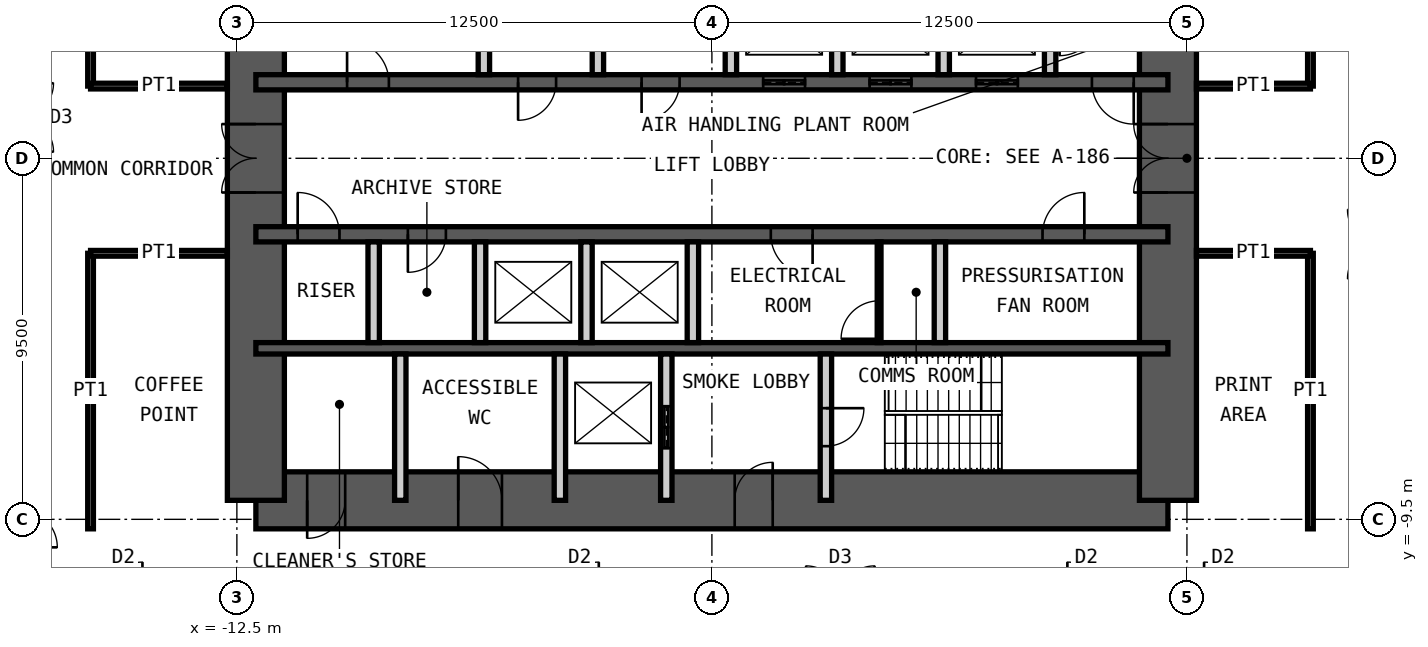
"""IFC4 building model, lengths in metres.
Left out: names, types, materials, properties, quantities, classifications, styles, units other than length and angle.
Written with IfcOpenShell. Run it as: python <this file> out.ifc"""

import sys

from ifc_helpers import new_model, si_unit, direction, frame, frame_2d, origin, place, context, subcontext, project, spatial, rectangle, extrude, element, fill, save


model = new_model("IFC4")
c1 = context("Model", 3, precision=1e-05, world=origin(), true_north=direction((0.0, 1.0)))
c2 = subcontext(c1, "Body", "Model", "MODEL_VIEW")
j1 = project(units=[si_unit("LENGTHUNIT", "METRE"), si_unit("PLANEANGLEUNIT", "RADIAN")], contexts=[c1])
p1 = place(None, origin())
s1 = spatial("IfcSite", under=j1, at=p1, CompositionType="ELEMENT")
p2 = place(p1, origin())
s2 = spatial("IfcBuilding", under=s1, at=p2, CompositionType="ELEMENT")
p3 = place(p2, frame((0.0, 0.0, 161.8)))
s3 = spatial("IfcBuildingStorey", under=s2, at=p3, CompositionType="ELEMENT", Elevation=161.8)
p4 = place(p3, frame((-12.0, -9.0, 0.0), z_axis=(0.0, 0.0, 1.0), x_axis=(1.0, 0.0, 0.0)))
e1 = element("IfcWall", 1, at=p4, inside=s3, PredefinedType="SHEAR", context=c2, shape_type="SweptSolid", body=[
    extrude(rectangle(XDim=24.0, YDim=1.5, at=frame_2d((12.0, 0.0))), origin(), (0.0, 0.0, 1.0), 4.2),
])
p5 = place(p4, frame((1.35, 0.0, 0.0)))
e2 = element("IfcOpeningElement", 2, at=p5, cuts=e1, PredefinedType="OPENING", context=c2, shape_type="SweptSolid", body=[
    extrude(rectangle(XDim=1.0, YDim=2.1, at=frame_2d((0.5, 1.05))), frame((0.0, 0.76, 0.0), z_axis=(0.0, -1.0, 0.0), x_axis=(1.0, 0.0, 0.0)), (0.0, 0.0, 1.0), 1.52),
])
p6 = place(p4, frame((5.325, 0.0, 0.0)))
e3 = element("IfcOpeningElement", 3, at=p6, cuts=e1, PredefinedType="OPENING", context=c2, shape_type="SweptSolid", body=[
    extrude(rectangle(XDim=1.15, YDim=2.1, at=frame_2d((0.575, 1.05))), frame((0.0, 0.76, 0.0), z_axis=(0.0, -1.0, 0.0), x_axis=(1.0, 0.0, 0.0)), (0.0, 0.0, 1.0), 1.52),
])
p7 = place(p4, frame((12.6, 0.0, 0.0)))
e4 = element("IfcOpeningElement", 4, at=p7, cuts=e1, PredefinedType="OPENING", context=c2, shape_type="SweptSolid", body=[
    extrude(rectangle(XDim=1.0, YDim=2.1, at=frame_2d((0.5, 1.05))), frame((0.0, 0.76, 0.0), z_axis=(0.0, -1.0, 0.0), x_axis=(1.0, 0.0, 0.0)), (0.0, 0.0, 1.0), 1.52),
])
p8 = place(p3, frame((12.0, -9.0, 0.0), z_axis=(0.0, 0.0, 1.0), x_axis=(0.0, 1.0, 0.0)))
e5 = element("IfcWall", 5, at=p8, inside=s3, PredefinedType="SHEAR", context=c2, shape_type="SweptSolid", body=[
    extrude(rectangle(XDim=18.0, YDim=1.5, at=frame_2d((9.0, 0.0))), origin(), (0.0, 0.0, 1.0), 4.2),
])
p9 = place(p8, frame((8.1, 0.0, 0.0)))
e6 = element("IfcOpeningElement", 6, at=p9, cuts=e5, PredefinedType="OPENING", context=c2, shape_type="SweptSolid", body=[
    extrude(rectangle(XDim=1.8, YDim=2.1, at=frame_2d((0.9, 1.05))), frame((0.0, 0.76, 0.0), z_axis=(0.0, -1.0, 0.0), x_axis=(1.0, 0.0, 0.0)), (0.0, 0.0, 1.0), 1.52),
])
p10 = place(p3, frame((-12.0, -9.0, 0.0), z_axis=(0.0, 0.0, 1.0), x_axis=(0.0, 1.0, 0.0)))
e7 = element("IfcWall", 7, at=p10, inside=s3, PredefinedType="SHEAR", context=c2, shape_type="SweptSolid", body=[
    extrude(rectangle(XDim=18.0, YDim=1.5, at=frame_2d((9.0, 0.0))), origin(), (0.0, 0.0, 1.0), 4.2),
])
p11 = place(p10, frame((8.1, 0.0, 0.0)))
e8 = element("IfcOpeningElement", 8, at=p11, cuts=e7, PredefinedType="OPENING", context=c2, shape_type="SweptSolid", body=[
    extrude(rectangle(XDim=1.8, YDim=2.1, at=frame_2d((0.9, 1.05))), frame((0.0, 0.76, 0.0), z_axis=(0.0, -1.0, 0.0), x_axis=(1.0, 0.0, 0.0)), (0.0, 0.0, 1.0), 1.52),
])
p12 = place(p3, frame((-12.0, 2.0, 0.0), z_axis=(0.0, 0.0, 1.0), x_axis=(1.0, 0.0, 0.0)))
e9 = element("IfcWall", 9, at=p12, inside=s3, PredefinedType="SHEAR", context=c2, shape_type="SweptSolid", body=[
    extrude(rectangle(XDim=24.0, YDim=0.4, at=frame_2d((12.0, 0.0))), origin(), (0.0, 0.0, 1.0), 4.2),
])
p13 = place(p12, frame((2.4, 0.0, 0.0)))
e10 = element("IfcOpeningElement", 10, at=p13, cuts=e9, PredefinedType="OPENING", context=c2, shape_type="SweptSolid", body=[
    extrude(rectangle(XDim=1.1, YDim=2.1, at=frame_2d((0.55, 1.05))), frame((0.0, 0.21, 0.0), z_axis=(0.0, -1.0, 0.0), x_axis=(1.0, 0.0, 0.0)), (0.0, 0.0, 1.0), 0.42),
])
p14 = place(p12, frame((22.0, 0.0, 0.0)))
e11 = element("IfcOpeningElement", 11, at=p14, cuts=e9, PredefinedType="OPENING", context=c2, shape_type="SweptSolid", body=[
    extrude(rectangle(XDim=1.1, YDim=2.1, at=frame_2d((0.55, 1.05))), frame((0.0, 0.21, 0.0), z_axis=(0.0, -1.0, 0.0), x_axis=(1.0, 0.0, 0.0)), (0.0, 0.0, 1.0), 0.42),
])
p15 = place(p12, frame((10.15, 0.0, 0.0)))
e12 = element("IfcOpeningElement", 12, at=p15, cuts=e9, PredefinedType="OPENING", context=c2, shape_type="SweptSolid", body=[
    extrude(rectangle(XDim=1.0, YDim=2.1, at=frame_2d((0.5, 1.05))), frame((0.0, 0.21, 0.0), z_axis=(0.0, -1.0, 0.0), x_axis=(1.0, 0.0, 0.0)), (0.0, 0.0, 1.0), 0.42),
])
p16 = place(p12, frame((6.9, 0.0, 0.0)))
e13 = element("IfcOpeningElement", 13, at=p16, cuts=e9, PredefinedType="OPENING", context=c2, shape_type="SweptSolid", body=[
    extrude(rectangle(XDim=1.0, YDim=2.1, at=frame_2d((0.5, 1.05))), frame((0.0, 0.21, 0.0), z_axis=(0.0, -1.0, 0.0), x_axis=(1.0, 0.0, 0.0)), (0.0, 0.0, 1.0), 0.42),
])
p17 = place(p12, frame((13.35, 0.0, 0.0)))
e14 = element("IfcOpeningElement", 14, at=p17, cuts=e9, PredefinedType="OPENING", context=c2, shape_type="SweptSolid", body=[
    extrude(rectangle(XDim=1.1, YDim=2.4, at=frame_2d((0.55, 1.2))), frame((0.0, 0.21, 0.0), z_axis=(0.0, -1.0, 0.0), x_axis=(1.0, 0.0, 0.0)), (0.0, 0.0, 1.0), 0.42),
])
p18 = place(p12, frame((16.15, 0.0, 0.0)))
e15 = element("IfcOpeningElement", 15, at=p18, cuts=e9, PredefinedType="OPENING", context=c2, shape_type="SweptSolid", body=[
    extrude(rectangle(XDim=1.1, YDim=2.4, at=frame_2d((0.55, 1.2))), frame((0.0, 0.21, 0.0), z_axis=(0.0, -1.0, 0.0), x_axis=(1.0, 0.0, 0.0)), (0.0, 0.0, 1.0), 0.42),
])
p19 = place(p12, frame((18.95, 0.0, 0.0)))
e16 = element("IfcOpeningElement", 16, at=p19, cuts=e9, PredefinedType="OPENING", context=c2, shape_type="SweptSolid", body=[
    extrude(rectangle(XDim=1.1, YDim=2.4, at=frame_2d((0.55, 1.2))), frame((0.0, 0.21, 0.0), z_axis=(0.0, -1.0, 0.0), x_axis=(1.0, 0.0, 0.0)), (0.0, 0.0, 1.0), 0.42),
])
p20 = place(p3, frame((-12.0, -2.0, 0.0), z_axis=(0.0, 0.0, 1.0), x_axis=(1.0, 0.0, 0.0)))
e17 = element("IfcWall", 17, at=p20, inside=s3, PredefinedType="SHEAR", context=c2, shape_type="SweptSolid", body=[
    extrude(rectangle(XDim=24.0, YDim=0.4, at=frame_2d((12.0, 0.0))), origin(), (0.0, 0.0, 1.0), 4.2),
])
p21 = place(p20, frame((1.1, 0.0, 0.0)))
e18 = element("IfcOpeningElement", 18, at=p21, cuts=e17, PredefinedType="OPENING", context=c2, shape_type="SweptSolid", body=[
    extrude(rectangle(XDim=1.1, YDim=2.1, at=frame_2d((0.55, 1.05))), frame((0.0, 0.21, 0.0), z_axis=(0.0, -1.0, 0.0), x_axis=(1.0, 0.0, 0.0)), (0.0, 0.0, 1.0), 0.42),
])
p22 = place(p20, frame((13.55, 0.0, 0.0)))
e19 = element("IfcOpeningElement", 19, at=p22, cuts=e17, PredefinedType="OPENING", context=c2, shape_type="SweptSolid", body=[
    extrude(rectangle(XDim=1.1, YDim=2.1, at=frame_2d((0.55, 1.05))), frame((0.0, 0.21, 0.0), z_axis=(0.0, -1.0, 0.0), x_axis=(1.0, 0.0, 0.0)), (0.0, 0.0, 1.0), 0.42),
])
p23 = place(p20, frame((20.7, 0.0, 0.0)))
e20 = element("IfcOpeningElement", 20, at=p23, cuts=e17, PredefinedType="OPENING", context=c2, shape_type="SweptSolid", body=[
    extrude(rectangle(XDim=1.1, YDim=2.1, at=frame_2d((0.55, 1.05))), frame((0.0, 0.21, 0.0), z_axis=(0.0, -1.0, 0.0), x_axis=(1.0, 0.0, 0.0)), (0.0, 0.0, 1.0), 0.42),
])
p24 = place(p20, frame((4.0, 0.0, 0.0)))
e21 = element("IfcOpeningElement", 21, at=p24, cuts=e17, PredefinedType="OPENING", context=c2, shape_type="SweptSolid", body=[
    extrude(rectangle(XDim=1.0, YDim=2.1, at=frame_2d((0.5, 1.05))), frame((0.0, 0.21, 0.0), z_axis=(0.0, -1.0, 0.0), x_axis=(1.0, 0.0, 0.0)), (0.0, 0.0, 1.0), 0.42),
])
p25 = place(p3, frame((-12.0, -5.0, 0.0), z_axis=(0.0, 0.0, 1.0), x_axis=(1.0, 0.0, 0.0)))
e22 = element("IfcWall", 22, at=p25, inside=s3, PredefinedType="SHEAR", context=c2, shape_type="SweptSolid", body=[
    extrude(rectangle(XDim=24.0, YDim=0.3, at=frame_2d((12.0, 0.0))), origin(), (0.0, 0.0, 1.0), 4.2),
])
for number, where, z_axis, x_axis in (
    (23, (-6.0, 2.2, 0.0), (0.0, 0.0, 1.0), (0.0, 1.0, 0.0)),
    (24, (-3.0, 2.2, 0.0), (0.0, 0.0, 1.0), (0.0, 1.0, 0.0)),
    (25, (0.5, 2.2, 0.0), (0.0, 0.0, 1.0), (0.0, 1.0, 0.0)),
    (26, (3.3, 2.2, 0.0), (0.0, 0.0, 1.0), (0.0, 1.0, 0.0)),
    (27, (6.1, 2.2, 0.0), (0.0, 0.0, 1.0), (0.0, 1.0, 0.0)),
    (28, (8.9, 2.2, 0.0), (0.0, 0.0, 1.0), (0.0, 1.0, 0.0)),
    (29, (-8.9, -4.85, 0.0), (0.0, 0.0, 1.0), (0.0, 1.0, 0.0)),
    (30, (-6.1, -4.85, 0.0), (0.0, 0.0, 1.0), (0.0, 1.0, 0.0)),
    (31, (-3.3, -4.85, 0.0), (0.0, 0.0, 1.0), (0.0, 1.0, 0.0)),
    (32, (-0.5, -4.85, 0.0), (0.0, 0.0, 1.0), (0.0, 1.0, 0.0)),
    (33, (6.0, -4.85, 0.0), (0.0, 0.0, 1.0), (0.0, 1.0, 0.0)),
):
    element("IfcWall", number, at=place(p3, frame(where, z_axis=z_axis, x_axis=x_axis)), inside=s3, PredefinedType="PARTITIONING", context=c2, shape_type="SweptSolid", body=[
        extrude(rectangle(XDim=2.65, YDim=0.3, at=frame_2d((1.325, 0.0))), origin(), (0.0, 0.0, 1.0), 3.98),
    ])
for number, where, z_axis, x_axis in (
    (34, (-8.2, -9.0, 0.0), (0.0, 0.0, 1.0), (0.0, 1.0, 0.0)),
    (35, (-4.0, -9.0, 0.0), (0.0, 0.0, 1.0), (0.0, 1.0, 0.0)),
):
    element("IfcWall", number, at=place(p3, frame(where, z_axis=z_axis, x_axis=x_axis)), inside=s3, PredefinedType="PARTITIONING", context=c2, shape_type="SweptSolid", body=[
        extrude(rectangle(XDim=3.85, YDim=0.3, at=frame_2d((1.925, 0.0))), origin(), (0.0, 0.0, 1.0), 3.98),
    ])
p26 = place(p3, frame((-1.2, -9.0, 0.0), z_axis=(0.0, 0.0, 1.0), x_axis=(0.0, 1.0, 0.0)))
e36 = element("IfcWall", 36, at=p26, inside=s3, PredefinedType="PARTITIONING", context=c2, shape_type="SweptSolid", body=[
    extrude(rectangle(XDim=3.85, YDim=0.3, at=frame_2d((1.925, 0.0))), origin(), (0.0, 0.0, 1.0), 3.98),
])
p27 = place(p26, frame((1.375, 0.0, 0.0)))
e37 = element("IfcOpeningElement", 37, at=p27, cuts=e36, PredefinedType="OPENING", context=c2, shape_type="SweptSolid", body=[
    extrude(rectangle(XDim=1.1, YDim=2.4, at=frame_2d((0.55, 1.2))), frame((0.0, 0.16, 0.0), z_axis=(0.0, -1.0, 0.0), x_axis=(1.0, 0.0, 0.0)), (0.0, 0.0, 1.0), 0.32),
])
p28 = place(p3, frame((3.0, -9.0, 0.0), z_axis=(0.0, 0.0, 1.0), x_axis=(0.0, 1.0, 0.0)))
e38 = element("IfcWall", 38, at=p28, inside=s3, PredefinedType="PARTITIONING", context=c2, shape_type="SweptSolid", body=[
    extrude(rectangle(XDim=3.85, YDim=0.3, at=frame_2d((1.925, 0.0))), origin(), (0.0, 0.0, 1.0), 3.98),
])
p29 = place(p28, frame((1.425, 0.0, 0.0)))
e39 = element("IfcOpeningElement", 39, at=p29, cuts=e38, PredefinedType="OPENING", context=c2, shape_type="SweptSolid", body=[
    extrude(rectangle(XDim=1.0, YDim=2.1, at=frame_2d((0.5, 1.05))), frame((0.0, 0.16, 0.0), z_axis=(0.0, -1.0, 0.0), x_axis=(1.0, 0.0, 0.0)), (0.0, 0.0, 1.0), 0.32),
])
p30 = place(p3, frame((4.4, -4.85, 0.0), z_axis=(0.0, 0.0, 1.0), x_axis=(0.0, 1.0, 0.0)))
e40 = element("IfcWall", 40, at=p30, inside=s3, PredefinedType="PARTITIONING", context=c2, shape_type="SweptSolid", body=[
    extrude(rectangle(XDim=2.65, YDim=0.1, at=frame_2d((1.325, 0.0))), origin(), (0.0, 0.0, 1.0), 3.98),
])
p31 = place(p30, frame((0.1, 0.0, 0.0)))
e41 = element("IfcOpeningElement", 41, at=p31, cuts=e40, PredefinedType="OPENING", context=c2, shape_type="SweptSolid", body=[
    extrude(rectangle(XDim=1.0, YDim=2.4, at=frame_2d((0.5, 1.2))), frame((0.0, 0.06, 0.0), z_axis=(0.0, -1.0, 0.0), x_axis=(1.0, 0.0, 0.0)), (0.0, 0.0, 1.0), 0.12),
])
p32 = place(p3, frame((15.75, 1.9, 0.0), z_axis=(0.0, 0.0, 1.0), x_axis=(0.0, 1.0, 0.0)))
e42 = element("IfcWall", 42, at=p32, inside=s3, PredefinedType="PARTITIONING", context=c2, shape_type="SweptSolid", body=[
    extrude(rectangle(XDim=7.85, YDim=0.15, at=frame_2d((3.925, 0.0))), origin(), (0.0, 0.0, 1.0), 4.03),
])
p33 = place(p3, frame((12.75, 1.9, 0.0), z_axis=(0.0, 0.0, 1.0), x_axis=(1.0, 0.0, 0.0)))
e43 = element("IfcWall", 43, at=p33, inside=s3, PredefinedType="PARTITIONING", context=c2, shape_type="SweptSolid", body=[
    extrude(rectangle(XDim=3.0, YDim=0.15, at=frame_2d((1.5, 0.0))), origin(), (0.0, 0.0, 1.0), 2.93),
])
p34 = place(p3, frame((15.75, -9.75, 0.0), z_axis=(0.0, 0.0, 1.0), x_axis=(0.0, 1.0, 0.0)))
e44 = element("IfcWall", 44, at=p34, inside=s3, PredefinedType="PARTITIONING", context=c2, shape_type="SweptSolid", body=[
    extrude(rectangle(XDim=7.25, YDim=0.15, at=frame_2d((3.625, 0.0))), origin(), (0.0, 0.0, 1.0), 4.03),
])
p35 = place(p3, frame((12.75, -2.5, 0.0), z_axis=(0.0, 0.0, 1.0), x_axis=(1.0, 0.0, 0.0)))
e45 = element("IfcWall", 45, at=p35, inside=s3, PredefinedType="PARTITIONING", context=c2, shape_type="SweptSolid", body=[
    extrude(rectangle(XDim=3.0, YDim=0.15, at=frame_2d((1.5, 0.0))), origin(), (0.0, 0.0, 1.0), 3.28),
])
p36 = place(p3, frame((-16.35, 1.9, 0.0), z_axis=(0.0, 0.0, 1.0), x_axis=(0.0, 1.0, 0.0)))
e46 = element("IfcWall", 46, at=p36, inside=s3, PredefinedType="PARTITIONING", context=c2, shape_type="SweptSolid", body=[
    extrude(rectangle(XDim=7.85, YDim=0.15, at=frame_2d((3.925, 0.0))), origin(), (0.0, 0.0, 1.0), 4.03),
])
p37 = place(p3, frame((-12.75, 1.9, 0.0), z_axis=(0.0, 0.0, 1.0), x_axis=(-1.0, 0.0, 0.0)))
e47 = element("IfcWall", 47, at=p37, inside=s3, PredefinedType="PARTITIONING", context=c2, shape_type="SweptSolid", body=[
    extrude(rectangle(XDim=3.6, YDim=0.15, at=frame_2d((1.8, 0.0))), origin(), (0.0, 0.0, 1.0), 3.33),
])
p38 = place(p3, frame((-16.35, -9.75, 0.0), z_axis=(0.0, 0.0, 1.0), x_axis=(0.0, 1.0, 0.0)))
e48 = element("IfcWall", 48, at=p38, inside=s3, PredefinedType="PARTITIONING", context=c2, shape_type="SweptSolid", body=[
    extrude(rectangle(XDim=7.25, YDim=0.15, at=frame_2d((3.625, 0.0))), origin(), (0.0, 0.0, 1.0), 4.03),
])
p39 = place(p3, frame((-12.75, -2.5, 0.0), z_axis=(0.0, 0.0, 1.0), x_axis=(-1.0, 0.0, 0.0)))
e49 = element("IfcWall", 49, at=p39, inside=s3, PredefinedType="PARTITIONING", context=c2, shape_type="SweptSolid", body=[
    extrude(rectangle(XDim=3.6, YDim=0.15, at=frame_2d((1.8, 0.0))), origin(), (0.0, 0.0, 1.0), 3.33),
])
p40 = place(p5, origin())
e50 = element("IfcDoor", 50, at=p40, inside=s3, OperationType="SINGLE_SWING_LEFT", PredefinedType="DOOR", context=c2, shape_type="SweptSolid", body=[
    extrude(rectangle(XDim=1.0, YDim=2.1, at=frame_2d((0.5, 1.05))), frame((0.0, 0.025, 0.0), z_axis=(0.0, -1.0, 0.0), x_axis=(1.0, 0.0, 0.0)), (0.0, 0.0, 1.0), 0.05),
])
fill(e2, e50)
p41 = place(p6, origin())
e51 = element("IfcDoor", 51, at=p41, inside=s3, OperationType="SINGLE_SWING_RIGHT", PredefinedType="DOOR", context=c2, shape_type="SweptSolid", body=[
    extrude(rectangle(XDim=1.15, YDim=2.1, at=frame_2d((0.575, 1.05))), frame((0.0, 0.025, 0.0), z_axis=(0.0, -1.0, 0.0), x_axis=(1.0, 0.0, 0.0)), (0.0, 0.0, 1.0), 0.05),
])
fill(e3, e51)
p42 = place(p7, origin())
e52 = element("IfcDoor", 52, at=p42, inside=s3, OperationType="SINGLE_SWING_LEFT", PredefinedType="DOOR", context=c2, shape_type="SweptSolid", body=[
    extrude(rectangle(XDim=1.0, YDim=2.1, at=frame_2d((0.5, 1.05))), frame((0.0, 0.025, 0.0), z_axis=(0.0, -1.0, 0.0), x_axis=(1.0, 0.0, 0.0)), (0.0, 0.0, 1.0), 0.05),
])
fill(e4, e52)
p43 = place(p29, origin())
e53 = element("IfcDoor", 53, at=p43, inside=s3, OperationType="SINGLE_SWING_RIGHT", PredefinedType="DOOR", context=c2, shape_type="SweptSolid", body=[
    extrude(rectangle(XDim=1.0, YDim=2.1, at=frame_2d((0.5, 1.05))), frame((0.0, 0.025, 0.0), z_axis=(0.0, -1.0, 0.0), x_axis=(1.0, 0.0, 0.0)), (0.0, 0.0, 1.0), 0.05),
])
fill(e39, e53)
p44 = place(p13, origin())
e54 = element("IfcDoor", 54, at=p44, inside=s3, OperationType="SINGLE_SWING_RIGHT", PredefinedType="DOOR", context=c2, shape_type="SweptSolid", body=[
    extrude(rectangle(XDim=1.1, YDim=2.1, at=frame_2d((0.55, 1.05))), frame((0.0, 0.025, 0.0), z_axis=(0.0, -1.0, 0.0), x_axis=(1.0, 0.0, 0.0)), (0.0, 0.0, 1.0), 0.05),
])
fill(e10, e54)
p45 = place(p21, origin())
e55 = element("IfcDoor", 55, at=p45, inside=s3, OperationType="SINGLE_SWING_RIGHT", PredefinedType="DOOR", context=c2, shape_type="SweptSolid", body=[
    extrude(rectangle(XDim=1.1, YDim=2.1, at=frame_2d((0.55, 1.05))), frame((0.0, 0.025, 0.0), z_axis=(0.0, -1.0, 0.0), x_axis=(1.0, 0.0, 0.0)), (0.0, 0.0, 1.0), 0.05),
])
fill(e18, e55)
p46 = place(p14, origin())
e56 = element("IfcDoor", 56, at=p46, inside=s3, OperationType="SINGLE_SWING_RIGHT", PredefinedType="DOOR", context=c2, shape_type="SweptSolid", body=[
    extrude(rectangle(XDim=1.1, YDim=2.1, at=frame_2d((0.55, 1.05))), frame((0.0, 0.025, 0.0), z_axis=(0.0, -1.0, 0.0), x_axis=(1.0, 0.0, 0.0)), (0.0, 0.0, 1.0), 0.05),
])
fill(e11, e56)
p47 = place(p15, origin())
e57 = element("IfcDoor", 57, at=p47, inside=s3, OperationType="SINGLE_SWING_LEFT", PredefinedType="DOOR", context=c2, shape_type="SweptSolid", body=[
    extrude(rectangle(XDim=1.0, YDim=2.1, at=frame_2d((0.5, 1.05))), frame((0.0, 0.025, 0.0), z_axis=(0.0, -1.0, 0.0), x_axis=(1.0, 0.0, 0.0)), (0.0, 0.0, 1.0), 0.05),
])
fill(e12, e57)
p48 = place(p22, origin())
e58 = element("IfcDoor", 58, at=p48, inside=s3, OperationType="SINGLE_SWING_RIGHT", PredefinedType="DOOR", context=c2, shape_type="SweptSolid", body=[
    extrude(rectangle(XDim=1.1, YDim=2.1, at=frame_2d((0.55, 1.05))), frame((0.0, 0.025, 0.0), z_axis=(0.0, -1.0, 0.0), x_axis=(1.0, 0.0, 0.0)), (0.0, 0.0, 1.0), 0.05),
])
fill(e19, e58)
p49 = place(p23, origin())
e59 = element("IfcDoor", 59, at=p49, inside=s3, OperationType="SINGLE_SWING_LEFT", PredefinedType="DOOR", context=c2, shape_type="SweptSolid", body=[
    extrude(rectangle(XDim=1.1, YDim=2.1, at=frame_2d((0.55, 1.05))), frame((0.0, 0.025, 0.0), z_axis=(0.0, -1.0, 0.0), x_axis=(1.0, 0.0, 0.0)), (0.0, 0.0, 1.0), 0.05),
])
fill(e20, e59)
p50 = place(p9, origin())
e60 = element("IfcDoor", 60, at=p50, inside=s3, OperationType="DOUBLE_DOOR_DOUBLE_SWING", PredefinedType="DOOR", context=c2, shape_type="SweptSolid", body=[
    extrude(rectangle(XDim=1.8, YDim=2.1, at=frame_2d((0.9, 1.05))), frame((0.0, 0.025, 0.0), z_axis=(0.0, -1.0, 0.0), x_axis=(1.0, 0.0, 0.0)), (0.0, 0.0, 1.0), 0.05),
])
fill(e6, e60)
p51 = place(p11, origin())
e61 = element("IfcDoor", 61, at=p51, inside=s3, OperationType="DOUBLE_DOOR_DOUBLE_SWING", PredefinedType="DOOR", context=c2, shape_type="SweptSolid", body=[
    extrude(rectangle(XDim=1.8, YDim=2.1, at=frame_2d((0.9, 1.05))), frame((0.0, 0.025, 0.0), z_axis=(0.0, -1.0, 0.0), x_axis=(1.0, 0.0, 0.0)), (0.0, 0.0, 1.0), 0.05),
])
fill(e8, e61)
p52 = place(p27, origin())
e62 = element("IfcDoor", 62, at=p52, inside=s3, OperationType="DOUBLE_DOOR_SLIDING", PredefinedType="DOOR", context=c2, shape_type="SweptSolid", body=[
    extrude(rectangle(XDim=1.1, YDim=2.4, at=frame_2d((0.55, 1.2))), frame((0.0, 0.025, 0.0), z_axis=(0.0, -1.0, 0.0), x_axis=(1.0, 0.0, 0.0)), (0.0, 0.0, 1.0), 0.05),
])
fill(e37, e62)
p53 = place(p16, origin())
e63 = element("IfcDoor", 63, at=p53, inside=s3, OperationType="SINGLE_SWING_LEFT", PredefinedType="DOOR", context=c2, shape_type="SweptSolid", body=[
    extrude(rectangle(XDim=1.0, YDim=2.1, at=frame_2d((0.5, 1.05))), frame((0.0, 0.025, 0.0), z_axis=(0.0, -1.0, 0.0), x_axis=(1.0, 0.0, 0.0)), (0.0, 0.0, 1.0), 0.05),
])
fill(e13, e63)
p54 = place(p17, origin())
e64 = element("IfcDoor", 64, at=p54, inside=s3, OperationType="DOUBLE_DOOR_SLIDING", PredefinedType="DOOR", context=c2, shape_type="SweptSolid", body=[
    extrude(rectangle(XDim=1.1, YDim=2.4, at=frame_2d((0.55, 1.2))), frame((0.0, 0.025, 0.0), z_axis=(0.0, -1.0, 0.0), x_axis=(1.0, 0.0, 0.0)), (0.0, 0.0, 1.0), 0.05),
])
fill(e14, e64)
p55 = place(p18, origin())
e65 = element("IfcDoor", 65, at=p55, inside=s3, OperationType="DOUBLE_DOOR_SLIDING", PredefinedType="DOOR", context=c2, shape_type="SweptSolid", body=[
    extrude(rectangle(XDim=1.1, YDim=2.4, at=frame_2d((0.55, 1.2))), frame((0.0, 0.025, 0.0), z_axis=(0.0, -1.0, 0.0), x_axis=(1.0, 0.0, 0.0)), (0.0, 0.0, 1.0), 0.05),
])
fill(e15, e65)
p56 = place(p19, origin())
e66 = element("IfcDoor", 66, at=p56, inside=s3, OperationType="DOUBLE_DOOR_SLIDING", PredefinedType="DOOR", context=c2, shape_type="SweptSolid", body=[
    extrude(rectangle(XDim=1.1, YDim=2.4, at=frame_2d((0.55, 1.2))), frame((0.0, 0.025, 0.0), z_axis=(0.0, -1.0, 0.0), x_axis=(1.0, 0.0, 0.0)), (0.0, 0.0, 1.0), 0.05),
])
fill(e16, e66)
p57 = place(p24, origin())
e67 = element("IfcDoor", 67, at=p57, inside=s3, OperationType="SINGLE_SWING_LEFT", PredefinedType="DOOR", context=c2, shape_type="SweptSolid", body=[
    extrude(rectangle(XDim=1.0, YDim=2.1, at=frame_2d((0.5, 1.05))), frame((0.0, 0.025, 0.0), z_axis=(0.0, -1.0, 0.0), x_axis=(1.0, 0.0, 0.0)), (0.0, 0.0, 1.0), 0.05),
])
fill(e21, e67)
p58 = place(p31, origin())
e68 = element("IfcDoor", 68, at=p58, inside=s3, OperationType="SINGLE_SWING_RIGHT", PredefinedType="DOOR", context=c2, shape_type="SweptSolid", body=[
    extrude(rectangle(XDim=1.0, YDim=2.4, at=frame_2d((0.5, 1.2))), frame((0.0, 0.025, 0.0), z_axis=(0.0, -1.0, 0.0), x_axis=(1.0, 0.0, 0.0)), (0.0, 0.0, 1.0), 0.05),
])
fill(e41, e68)
save(model, sys.argv[1])
